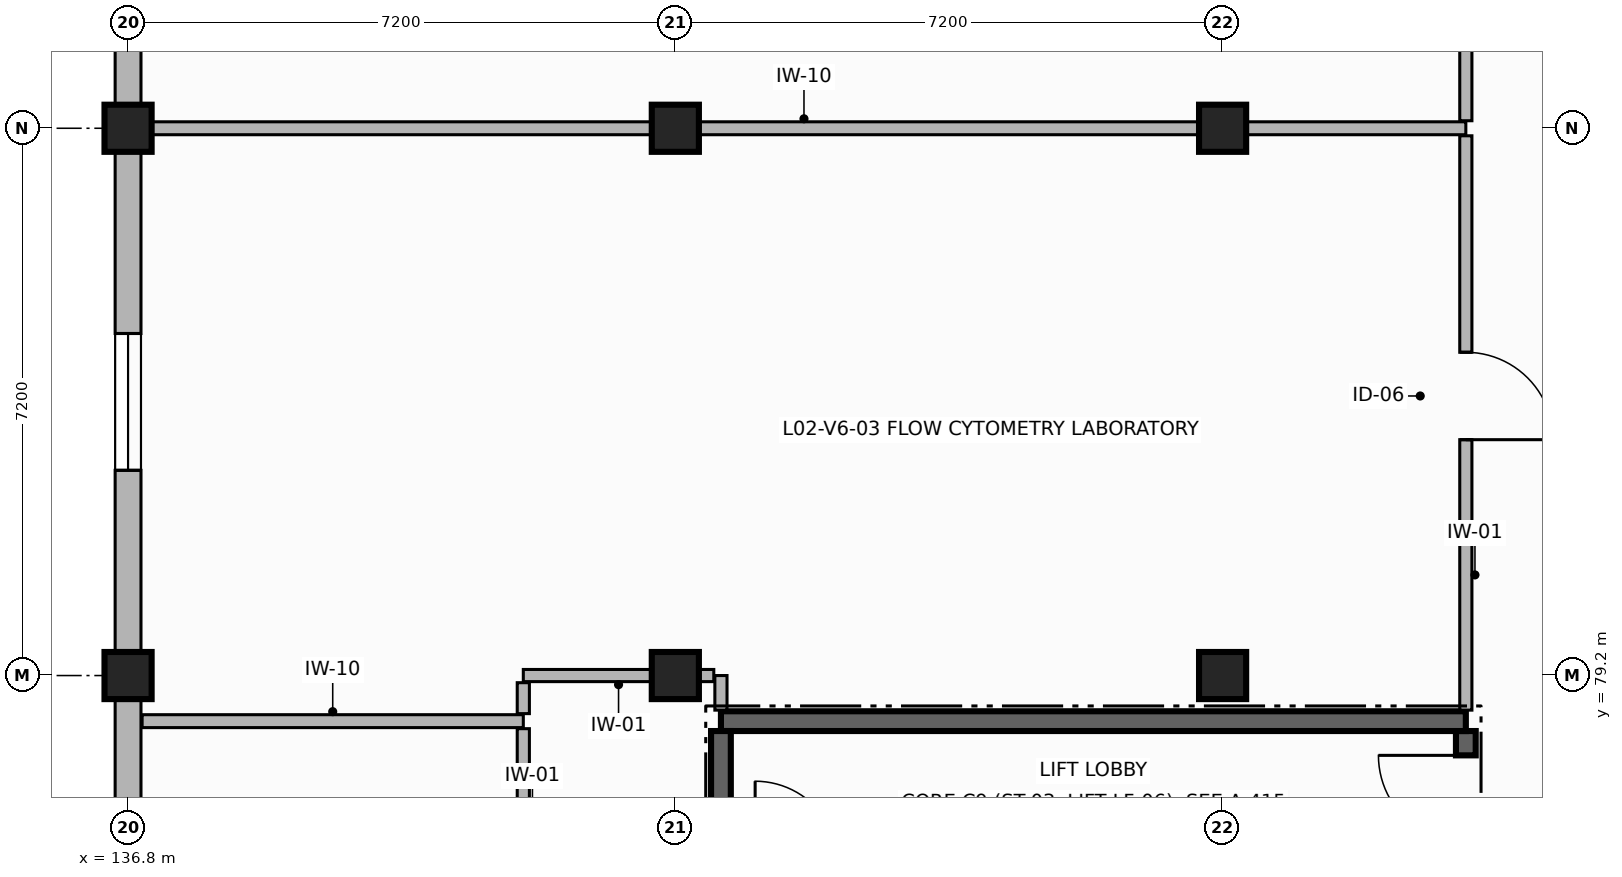
"""IFC4 building model, lengths in metres.
Left out: names, types, materials, properties, quantities, classifications, styles, units other than length and angle.
Written with IfcOpenShell. Run it as: python <this file> out.ifc"""

import sys

from ifc_helpers import new_model, si_unit, direction, frame, frame_2d, origin, origin_2d, place, context, subcontext, project, spatial, rectangle, extrude, element, fill, save


model = new_model("IFC4")
c1 = context("Model", 3, precision=1e-05, world=origin(), true_north=direction((0.0, 1.0)))
c2 = subcontext(c1, "Body", "Model", "MODEL_VIEW")
j1 = project(units=[si_unit("LENGTHUNIT", "METRE"), si_unit("PLANEANGLEUNIT", "RADIAN")], contexts=[c1])
p1 = place(None, origin())
s1 = spatial("IfcSite", under=j1, at=p1, CompositionType="ELEMENT")
p2 = place(p1, origin())
s2 = spatial("IfcBuilding", under=s1, at=p2, CompositionType="ELEMENT")
p3 = place(p2, frame((0.0, 0.0, 8.4)))
s3 = spatial("IfcBuildingStorey", under=s2, at=p3, CompositionType="ELEMENT", Elevation=8.4)
for number, where, z_axis, x_axis in (
    (1, (136.8, 79.2, 0.0), (0.0, 0.0, 1.0), (1.0, 0.0, 0.0)),
    (2, (136.8, 86.4, 0.0), (0.0, 0.0, 1.0), (1.0, 0.0, 0.0)),
    (3, (144.0, 79.2, 0.0), (0.0, 0.0, 1.0), (1.0, 0.0, 0.0)),
    (4, (144.0, 86.4, 0.0), (0.0, 0.0, 1.0), (1.0, 0.0, 0.0)),
    (5, (151.2, 79.2, 0.0), (0.0, 0.0, 1.0), (1.0, 0.0, 0.0)),
    (6, (151.2, 86.4, 0.0), (0.0, 0.0, 1.0), (1.0, 0.0, 0.0)),
):
    element("IfcColumn", number, at=place(p3, frame(where, z_axis=z_axis, x_axis=x_axis)), inside=s3, PredefinedType="COLUMN", context=c2, shape_type="SweptSolid", body=[
        extrude(rectangle(XDim=0.62, YDim=0.62, at=origin_2d()), origin(), (0.0, 0.0, 1.0), 3.58),
    ])
p4 = place(p3, frame((136.8, 93.6, 0.0), z_axis=(0.0, 0.0, 1.0), x_axis=(0.0, -1.0, 0.0)))
e7 = element("IfcWall", 7, at=p4, inside=s3, PredefinedType="SOLIDWALL", context=c2, shape_type="SweptSolid", body=[
    extrude(rectangle(XDim=7.2, YDim=0.34, at=frame_2d((3.6, 0.0))), origin(), (0.0, 0.0, 1.0), 2.91),
])
p5 = place(p4, frame((2.7, 0.0, 0.85)))
e8 = element("IfcOpeningElement", 8, at=p5, cuts=e7, PredefinedType="OPENING", context=c2, shape_type="SweptSolid", body=[
    extrude(rectangle(XDim=1.8, YDim=1.85, at=frame_2d((0.9, 0.925))), frame((0.0, 0.18, 0.0), z_axis=(0.0, -1.0, 0.0), x_axis=(1.0, 0.0, 0.0)), (0.0, 0.0, 1.0), 0.36),
])
p6 = place(p3, frame((136.8, 86.4, 0.0), z_axis=(0.0, 0.0, 1.0), x_axis=(0.0, -1.0, 0.0)))
e9 = element("IfcWall", 9, at=p6, inside=s3, PredefinedType="SOLIDWALL", context=c2, shape_type="SweptSolid", body=[
    extrude(rectangle(XDim=7.2, YDim=0.34, at=frame_2d((3.6, 0.0))), origin(), (0.0, 0.0, 1.0), 2.91),
])
p7 = place(p6, frame((2.7, 0.0, 0.85)))
e10 = element("IfcOpeningElement", 10, at=p7, cuts=e9, PredefinedType="OPENING", context=c2, shape_type="SweptSolid", body=[
    extrude(rectangle(XDim=1.8, YDim=1.85, at=frame_2d((0.9, 0.925))), frame((0.0, 0.18, 0.0), z_axis=(0.0, -1.0, 0.0), x_axis=(1.0, 0.0, 0.0)), (0.0, 0.0, 1.0), 0.36),
])
p8 = place(p3, frame((136.8, 79.2, 0.0), z_axis=(0.0, 0.0, 1.0), x_axis=(0.0, -1.0, 0.0)))
e11 = element("IfcWall", 11, at=p8, inside=s3, PredefinedType="SOLIDWALL", context=c2, shape_type="SweptSolid", body=[
    extrude(rectangle(XDim=7.2, YDim=0.34, at=frame_2d((3.6, 0.0))), origin(), (0.0, 0.0, 1.0), 2.91),
])
p9 = place(p8, frame((2.6, 0.0, 0.85)))
e12 = element("IfcOpeningElement", 12, at=p9, cuts=e11, PredefinedType="OPENING", context=c2, shape_type="SweptSolid", body=[
    extrude(rectangle(XDim=1.8, YDim=1.85, at=frame_2d((0.9, 0.925))), frame((0.0, 0.18, 0.0), z_axis=(0.0, -1.0, 0.0), x_axis=(1.0, 0.0, 0.0)), (0.0, 0.0, 1.0), 0.36),
])
p10 = place(p3, frame((154.4, 72.93, 0.0), z_axis=(0.0, 0.0, 1.0), x_axis=(0.0, 1.0, 0.0)))
e13 = element("IfcWall", 13, at=p10, inside=s3, PredefinedType="SHEAR", context=c2, shape_type="SweptSolid", body=[
    extrude(rectangle(XDim=5.54, YDim=0.26, at=frame_2d((2.77, 0.0))), origin(), (0.0, 0.0, 1.0), 3.58),
])
p11 = place(p10, frame((4.07, 0.0, 0.0)))
e14 = element("IfcOpeningElement", 14, at=p11, cuts=e13, PredefinedType="OPENING", context=c2, shape_type="SweptSolid", body=[
    extrude(rectangle(XDim=1.15, YDim=2.2, at=frame_2d((0.575, 1.1))), frame((0.0, 0.14, 0.0), z_axis=(0.0, -1.0, 0.0), x_axis=(1.0, 0.0, 0.0)), (0.0, 0.0, 1.0), 0.28),
])
p12 = place(p3, frame((154.4, 78.6, 0.0), z_axis=(0.0, 0.0, 1.0), x_axis=(-1.0, 0.0, 0.0)))
e15 = element("IfcWall", 15, at=p12, inside=s3, PredefinedType="SHEAR", context=c2, shape_type="SweptSolid", body=[
    extrude(rectangle(XDim=9.8, YDim=0.26, at=frame_2d((4.9, 0.0))), origin(), (0.0, 0.0, 1.0), 3.58),
])
p13 = place(p3, frame((144.6, 78.47, 0.0), z_axis=(0.0, 0.0, 1.0), x_axis=(0.0, -1.0, 0.0)))
e16 = element("IfcWall", 16, at=p13, inside=s3, PredefinedType="SHEAR", context=c2, shape_type="SweptSolid", body=[
    extrude(rectangle(XDim=5.54, YDim=0.26, at=frame_2d((2.77, 0.0))), origin(), (0.0, 0.0, 1.0), 3.58),
])
p14 = place(p3, frame((136.985, 78.6, 0.0), z_axis=(0.0, 0.0, 1.0), x_axis=(1.0, 0.0, 0.0)))
e17 = element("IfcWall", 17, at=p14, inside=s3, PredefinedType="PARTITIONING", context=c2, shape_type="SweptSolid", body=[
    extrude(rectangle(XDim=5.015, YDim=0.17, at=frame_2d((2.507, 0.0))), origin(), (0.0, 0.0, 1.0), 2.89),
])
p15 = place(p3, frame((142.0, 78.501, 0.0), z_axis=(0.0, 0.0, 1.0), x_axis=(0.0, -1.0, 0.0)))
e18 = element("IfcWall", 18, at=p15, inside=s3, PredefinedType="PARTITIONING", context=c2, shape_type="SweptSolid", body=[
    extrude(rectangle(XDim=5.602, YDim=0.16, at=frame_2d((2.801, 0.0))), origin(), (0.0, 0.0, 1.0), 2.89),
])
p16 = place(p15, frame((2.342, 0.0, 0.0)))
e19 = element("IfcOpeningElement", 19, at=p16, cuts=e18, PredefinedType="OPENING", context=c2, shape_type="SweptSolid", body=[
    extrude(rectangle(XDim=1.15, YDim=2.25, at=frame_2d((0.575, 1.125))), frame((0.0, 0.09, 0.0), z_axis=(0.0, -1.0, 0.0), x_axis=(1.0, 0.0, 0.0)), (0.0, 0.0, 1.0), 0.18),
])
p17 = place(p3, frame((144.6, 78.745, 0.0), z_axis=(0.0, 0.0, 1.0), x_axis=(0.0, 1.0, 0.0)))
e20 = element("IfcWall", 20, at=p17, inside=s3, PredefinedType="PARTITIONING", context=c2, shape_type="SweptSolid", body=[
    extrude(rectangle(XDim=0.455, YDim=0.16, at=frame_2d((0.228, 0.0))), origin(), (0.0, 0.0, 1.0), 2.89),
])
p18 = place(p3, frame((144.506, 79.2, 0.0), z_axis=(0.0, 0.0, 1.0), x_axis=(-1.0, 0.0, 0.0)))
e21 = element("IfcWall", 21, at=p18, inside=s3, PredefinedType="PARTITIONING", context=c2, shape_type="SweptSolid", body=[
    extrude(rectangle(XDim=2.506, YDim=0.16, at=frame_2d((1.253, 0.0))), origin(), (0.0, 0.0, 1.0), 2.89),
])
p19 = place(p3, frame((142.0, 79.106, 0.0), z_axis=(0.0, 0.0, 1.0), x_axis=(0.0, -1.0, 0.0)))
e22 = element("IfcWall", 22, at=p19, inside=s3, PredefinedType="PARTITIONING", context=c2, shape_type="SweptSolid", body=[
    extrude(rectangle(XDim=0.407, YDim=0.16, at=frame_2d((0.204, 0.0))), origin(), (0.0, 0.0, 1.0), 2.89),
])
p20 = place(p3, frame((136.985, 86.4, 0.0), z_axis=(0.0, 0.0, 1.0), x_axis=(1.0, 0.0, 0.0)))
e23 = element("IfcWall", 23, at=p20, inside=s3, PredefinedType="PARTITIONING", context=c2, shape_type="SweptSolid", body=[
    extrude(rectangle(XDim=17.415, YDim=0.17, at=frame_2d((8.708, 0.0))), origin(), (0.0, 0.0, 1.0), 2.89),
])
p21 = place(p3, frame((154.4, 86.301, 0.0), z_axis=(0.0, 0.0, 1.0), x_axis=(0.0, -1.0, 0.0)))
e24 = element("IfcWall", 24, at=p21, inside=s3, PredefinedType="PARTITIONING", context=c2, shape_type="SweptSolid", body=[
    extrude(rectangle(XDim=7.556, YDim=0.16, at=frame_2d((3.778, 0.0))), origin(), (0.0, 0.0, 1.0), 2.89),
])
p22 = place(p21, frame((2.848, 0.0, 0.0)))
e25 = element("IfcOpeningElement", 25, at=p22, cuts=e24, PredefinedType="OPENING", context=c2, shape_type="SweptSolid", body=[
    extrude(rectangle(XDim=1.15, YDim=2.25, at=frame_2d((0.575, 1.125))), frame((0.0, 0.09, 0.0), z_axis=(0.0, -1.0, 0.0), x_axis=(1.0, 0.0, 0.0)), (0.0, 0.0, 1.0), 0.18),
])
p23 = place(p3, frame((154.4, 93.521, 0.0), z_axis=(0.0, 0.0, 1.0), x_axis=(0.0, -1.0, 0.0)))
e26 = element("IfcWall", 26, at=p23, inside=s3, PredefinedType="PARTITIONING", context=c2, shape_type="SweptSolid", body=[
    extrude(rectangle(XDim=7.022, YDim=0.16, at=frame_2d((3.511, 0.0))), origin(), (0.0, 0.0, 1.0), 2.89),
])
p24 = place(p23, frame((3.001, 0.0, 0.0)))
e27 = element("IfcOpeningElement", 27, at=p24, cuts=e26, PredefinedType="OPENING", context=c2, shape_type="SweptSolid", body=[
    extrude(rectangle(XDim=1.25, YDim=2.2, at=frame_2d((0.625, 1.1))), frame((0.0, 0.09, 0.0), z_axis=(0.0, -1.0, 0.0), x_axis=(1.0, 0.0, 0.0)), (0.0, 0.0, 1.0), 0.18),
])
p25 = place(p7, origin())
e28 = element("IfcWindow", 28, at=p25, inside=s3, PartitioningType="SINGLE_PANEL", PredefinedType="WINDOW", context=c2, shape_type="SweptSolid", body=[
    extrude(rectangle(XDim=1.8, YDim=1.85, at=frame_2d((0.9, 0.925))), frame((0.0, 0.03, 0.0), z_axis=(0.0, -1.0, 0.0), x_axis=(1.0, 0.0, 0.0)), (0.0, 0.0, 1.0), 0.06),
])
fill(e10, e28)
p26 = place(p11, origin())
e29 = element("IfcDoor", 29, at=p26, inside=s3, OperationType="SINGLE_SWING_RIGHT", PredefinedType="DOOR", context=c2, shape_type="SweptSolid", body=[
    extrude(rectangle(XDim=1.15, YDim=2.2, at=frame_2d((0.575, 1.1))), frame((0.0, 0.025, 0.0), z_axis=(0.0, -1.0, 0.0), x_axis=(1.0, 0.0, 0.0)), (0.0, 0.0, 1.0), 0.05),
])
fill(e14, e29)
p27 = place(p22, origin())
e30 = element("IfcDoor", 30, at=p27, inside=s3, OperationType="SINGLE_SWING_RIGHT", PredefinedType="DOOR", context=c2, shape_type="SweptSolid", body=[
    extrude(rectangle(XDim=1.15, YDim=2.25, at=frame_2d((0.575, 1.125))), frame((0.0, 0.025, 0.0), z_axis=(0.0, -1.0, 0.0), x_axis=(1.0, 0.0, 0.0)), (0.0, 0.0, 1.0), 0.05),
])
fill(e25, e30)
save(model, sys.argv[1])
